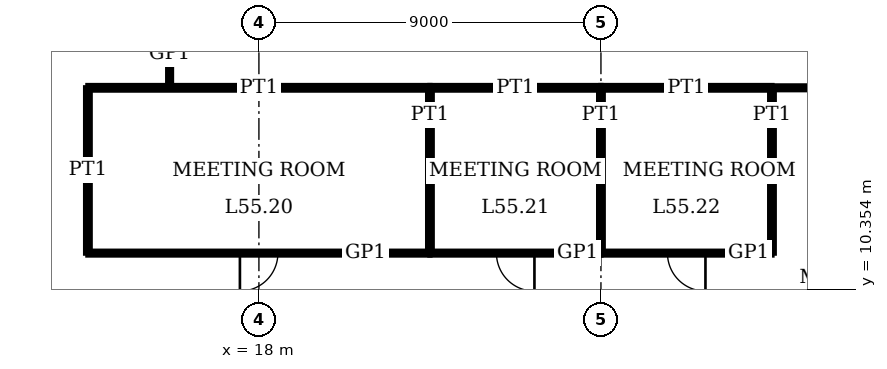
"""IFC4 building model, lengths in metres.
Left out: names, types, materials, properties, quantities, classifications, styles, units other than length and angle.
Written with IfcOpenShell. Run it as: python <this file> out.ifc"""

import sys

from ifc_helpers import new_model, si_unit, direction, frame, frame_2d, origin, place, context, subcontext, project, spatial, rectangle, extrude, element, fill, save


model = new_model("IFC4")
c1 = context("Model", 3, precision=1e-05, world=origin(), true_north=direction((0.0, 1.0)))
c2 = subcontext(c1, "Body", "Model", "MODEL_VIEW")
j1 = project(units=[si_unit("LENGTHUNIT", "METRE"), si_unit("PLANEANGLEUNIT", "RADIAN")], contexts=[c1])
p1 = place(None, origin())
s1 = spatial("IfcSite", under=j1, at=p1, CompositionType="ELEMENT")
p2 = place(p1, origin())
s2 = spatial("IfcBuilding", under=s1, at=p2, CompositionType="ELEMENT")
p3 = place(p2, frame((0.0, 0.0, 226.2)))
s3 = spatial("IfcBuildingStorey", under=s2, at=p3, CompositionType="ELEMENT", Elevation=226.2)
p4 = place(p3, frame((13.5, 11.3, 0.0), z_axis=(0.0, 0.0, 1.0), x_axis=(1.0, 0.0, 0.0)))
e1 = element("IfcWall", 1, at=p4, inside=s3, PredefinedType="PARTITIONING", context=c2, shape_type="SweptSolid", body=[
    extrude(rectangle(XDim=9.0, YDim=0.1, at=frame_2d((4.5, 0.0))), origin(), (0.0, 0.0, 1.0), 3.75),
])
p5 = place(p4, frame((4.0, 0.0, 0.0)))
e2 = element("IfcOpeningElement", 2, at=p5, cuts=e1, PredefinedType="OPENING", context=c2, shape_type="SweptSolid", body=[
    extrude(rectangle(XDim=1.0, YDim=2.4, at=frame_2d((0.5, 1.2))), frame((0.0, 0.06, 0.0), z_axis=(0.0, -1.0, 0.0), x_axis=(1.0, 0.0, 0.0)), (0.0, 0.0, 1.0), 0.12),
])
p6 = place(p3, frame((22.5, 11.3, 0.0), z_axis=(0.0, 0.0, 1.0), x_axis=(1.0, 0.0, 0.0)))
e3 = element("IfcWall", 3, at=p6, inside=s3, PredefinedType="PARTITIONING", context=c2, shape_type="SweptSolid", body=[
    extrude(rectangle(XDim=4.5, YDim=0.1, at=frame_2d((2.25, 0.0))), origin(), (0.0, 0.0, 1.0), 3.75),
])
p7 = place(p6, frame((1.75, 0.0, 0.0)))
e4 = element("IfcOpeningElement", 4, at=p7, cuts=e3, PredefinedType="OPENING", context=c2, shape_type="SweptSolid", body=[
    extrude(rectangle(XDim=1.0, YDim=2.4, at=frame_2d((0.5, 1.2))), frame((0.0, 0.06, 0.0), z_axis=(0.0, -1.0, 0.0), x_axis=(1.0, 0.0, 0.0)), (0.0, 0.0, 1.0), 0.12),
])
p8 = place(p3, frame((27.0, 11.3, 0.0), z_axis=(0.0, 0.0, 1.0), x_axis=(1.0, 0.0, 0.0)))
e5 = element("IfcWall", 5, at=p8, inside=s3, PredefinedType="PARTITIONING", context=c2, shape_type="SweptSolid", body=[
    extrude(rectangle(XDim=4.5, YDim=0.1, at=frame_2d((2.25, 0.0))), origin(), (0.0, 0.0, 1.0), 3.75),
])
p9 = place(p8, frame((1.75, 0.0, 0.0)))
e6 = element("IfcOpeningElement", 6, at=p9, cuts=e5, PredefinedType="OPENING", context=c2, shape_type="SweptSolid", body=[
    extrude(rectangle(XDim=1.0, YDim=2.4, at=frame_2d((0.5, 1.2))), frame((0.0, 0.06, 0.0), z_axis=(0.0, -1.0, 0.0), x_axis=(1.0, 0.0, 0.0)), (0.0, 0.0, 1.0), 0.12),
])
p10 = place(p3, frame((13.5, 15.65, 0.0), z_axis=(0.0, 0.0, 1.0), x_axis=(1.0, 0.0, 0.0)))
e7 = element("IfcWall", 7, at=p10, inside=s3, PredefinedType="PARTITIONING", context=c2, shape_type="SweptSolid", body=[
    extrude(rectangle(XDim=9.0, YDim=0.12, at=frame_2d((4.5, 0.0))), origin(), (0.0, 0.0, 1.0), 3.75),
])
for number, where, z_axis, x_axis in (
    (8, (22.5, 15.65, 0.0), (0.0, 0.0, 1.0), (1.0, 0.0, 0.0)),
    (9, (27.0, 15.65, 0.0), (0.0, 0.0, 1.0), (1.0, 0.0, 0.0)),
):
    element("IfcWall", number, at=place(p3, frame(where, z_axis=z_axis, x_axis=x_axis)), inside=s3, PredefinedType="PARTITIONING", context=c2, shape_type="SweptSolid", body=[
        extrude(rectangle(XDim=4.5, YDim=0.12, at=frame_2d((2.25, 0.0))), origin(), (0.0, 0.0, 1.0), 3.75),
    ])
p11 = place(p3, frame((31.5, 15.65, 0.0), z_axis=(0.0, 0.0, 1.0), x_axis=(1.0, 0.0, 0.0)))
e10 = element("IfcWall", 10, at=p11, inside=s3, PredefinedType="PARTITIONING", context=c2, shape_type="SweptSolid", body=[
    extrude(rectangle(XDim=15.85, YDim=0.1, at=frame_2d((7.925, 0.0))), origin(), (0.0, 0.0, 1.0), 3.75),
])
p12 = place(p11, frame((7.425, 0.0, 0.0)))
e11 = element("IfcOpeningElement", 11, at=p12, cuts=e10, PredefinedType="OPENING", context=c2, shape_type="SweptSolid", body=[
    extrude(rectangle(XDim=1.0, YDim=2.4, at=frame_2d((0.5, 1.2))), frame((0.0, 0.06, 0.0), z_axis=(0.0, -1.0, 0.0), x_axis=(1.0, 0.0, 0.0)), (0.0, 0.0, 1.0), 0.12),
])
p13 = place(p3, frame((13.5, 11.3, 0.0), z_axis=(0.0, 0.0, 1.0), x_axis=(0.0, 1.0, 0.0)))
e12 = element("IfcWall", 12, at=p13, inside=s3, PredefinedType="PARTITIONING", context=c2, shape_type="SweptSolid", body=[
    extrude(rectangle(XDim=4.35, YDim=0.12, at=frame_2d((2.175, 0.0))), origin(), (0.0, 0.0, 1.0), 3.75),
])
p14 = place(p3, frame((15.65, 15.65, 0.0), z_axis=(0.0, 0.0, 1.0), x_axis=(0.0, 1.0, 0.0)))
e13 = element("IfcWall", 13, at=p14, inside=s3, PredefinedType="PARTITIONING", context=c2, shape_type="SweptSolid", body=[
    extrude(rectangle(XDim=1.8, YDim=0.1, at=frame_2d((0.9, 0.0))), origin(), (0.0, 0.0, 1.0), 3.75),
])
p15 = place(p3, frame((22.5, 11.3, 0.0), z_axis=(0.0, 0.0, 1.0), x_axis=(0.0, 1.0, 0.0)))
e14 = element("IfcWall", 14, at=p15, inside=s3, PredefinedType="PARTITIONING", context=c2, shape_type="SweptSolid", body=[
    extrude(rectangle(XDim=4.35, YDim=0.12, at=frame_2d((2.175, 0.0))), origin(), (0.0, 0.0, 1.0), 3.75),
])
p16 = place(p3, frame((27.0, 11.3, 0.0), z_axis=(0.0, 0.0, 1.0), x_axis=(0.0, 1.0, 0.0)))
e15 = element("IfcWall", 15, at=p16, inside=s3, PredefinedType="PARTITIONING", context=c2, shape_type="SweptSolid", body=[
    extrude(rectangle(XDim=4.35, YDim=0.12, at=frame_2d((2.175, 0.0))), origin(), (0.0, 0.0, 1.0), 3.05),
])
p17 = place(p3, frame((31.5, 11.3, 0.0), z_axis=(0.0, 0.0, 1.0), x_axis=(0.0, 1.0, 0.0)))
e16 = element("IfcWall", 16, at=p17, inside=s3, PredefinedType="PARTITIONING", context=c2, shape_type="SweptSolid", body=[
    extrude(rectangle(XDim=4.35, YDim=0.12, at=frame_2d((2.175, 0.0))), origin(), (0.0, 0.0, 1.0), 3.75),
])
p18 = place(p5, origin())
e17 = element("IfcDoor", 17, at=p18, inside=s3, OperationType="SINGLE_SWING_LEFT", PredefinedType="DOOR", context=c2, shape_type="SweptSolid", body=[
    extrude(rectangle(XDim=1.0, YDim=2.4, at=frame_2d((0.5, 1.2))), frame((0.0, 0.02, 0.0), z_axis=(0.0, -1.0, 0.0), x_axis=(1.0, 0.0, 0.0)), (0.0, 0.0, 1.0), 0.04),
])
fill(e2, e17)
p19 = place(p7, origin())
e18 = element("IfcDoor", 18, at=p19, inside=s3, OperationType="SINGLE_SWING_RIGHT", PredefinedType="DOOR", context=c2, shape_type="SweptSolid", body=[
    extrude(rectangle(XDim=1.0, YDim=2.4, at=frame_2d((0.5, 1.2))), frame((0.0, 0.02, 0.0), z_axis=(0.0, -1.0, 0.0), x_axis=(1.0, 0.0, 0.0)), (0.0, 0.0, 1.0), 0.04),
])
fill(e4, e18)
p20 = place(p9, origin())
e19 = element("IfcDoor", 19, at=p20, inside=s3, OperationType="SINGLE_SWING_RIGHT", PredefinedType="DOOR", context=c2, shape_type="SweptSolid", body=[
    extrude(rectangle(XDim=1.0, YDim=2.4, at=frame_2d((0.5, 1.2))), frame((0.0, 0.02, 0.0), z_axis=(0.0, -1.0, 0.0), x_axis=(1.0, 0.0, 0.0)), (0.0, 0.0, 1.0), 0.04),
])
fill(e6, e19)
save(model, sys.argv[1])
